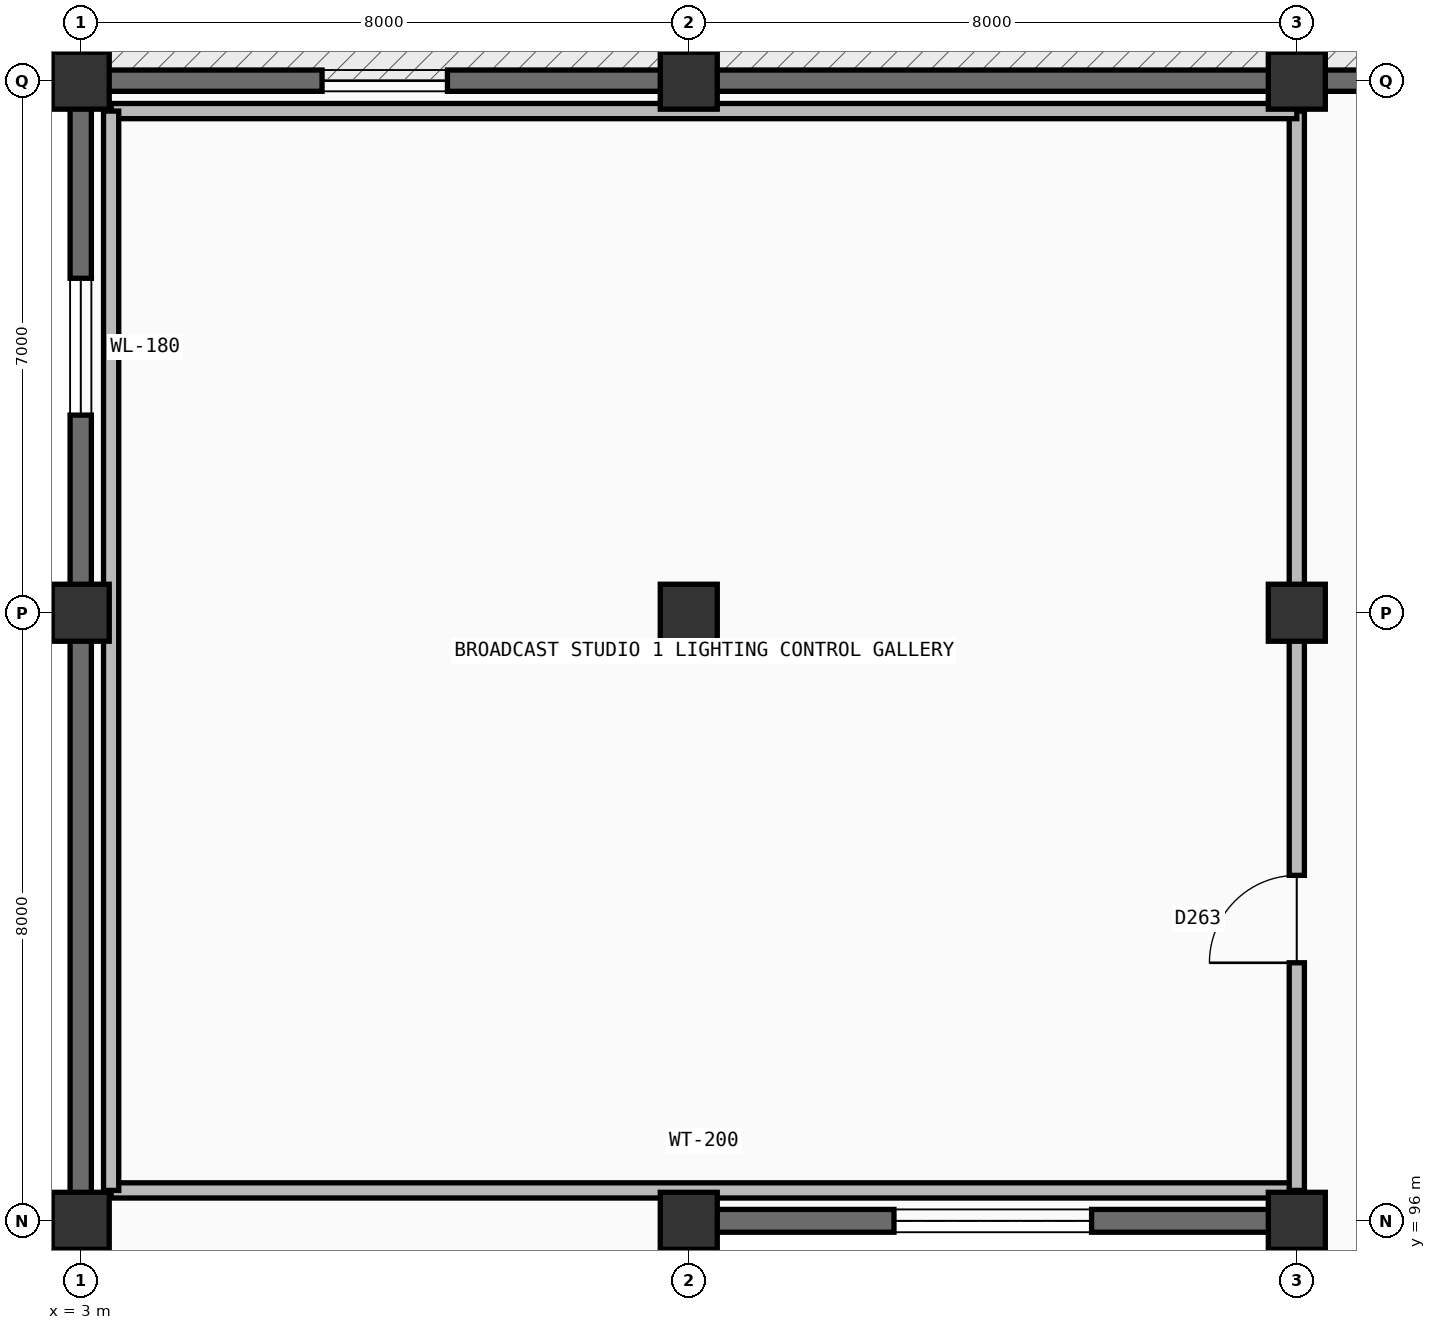
"""IFC4 building model, lengths in metres.
Left out: names, types, materials, properties, quantities, classifications, styles, units other than length and angle.
Written with IfcOpenShell. Run it as: python <this file> out.ifc"""

import sys

from ifc_helpers import new_model, si_unit, direction, frame, frame_2d, origin, origin_2d, place, context, subcontext, project, spatial, rectangle, extrude, element, fill, save


model = new_model("IFC4")
c1 = context("Model", 3, precision=1e-05, world=origin(), true_north=direction((0.0, 1.0)))
c2 = subcontext(c1, "Body", "Model", "MODEL_VIEW")
j1 = project(units=[si_unit("LENGTHUNIT", "METRE"), si_unit("PLANEANGLEUNIT", "RADIAN")], contexts=[c1])
p1 = place(None, origin())
s1 = spatial("IfcSite", under=j1, at=p1, CompositionType="ELEMENT")
p2 = place(p1, origin())
s2 = spatial("IfcBuilding", under=s1, at=p2, CompositionType="ELEMENT")
p3 = place(p2, frame((0.0, 0.0, 5.4)))
s3 = spatial("IfcBuildingStorey", under=s2, at=p3, CompositionType="ELEMENT", Elevation=5.4)
for number, where, z_axis, x_axis in (
    (1, (3.0, 96.0, 0.0), (0.0, 0.0, 1.0), (1.0, 0.0, 0.0)),
    (2, (3.0, 104.0, 0.0), (0.0, 0.0, 1.0), (1.0, 0.0, 0.0)),
    (3, (3.0, 111.0, 0.0), (0.0, 0.0, 1.0), (1.0, 0.0, 0.0)),
    (4, (11.0, 96.0, 0.0), (0.0, 0.0, 1.0), (1.0, 0.0, 0.0)),
    (5, (11.0, 104.0, 0.0), (0.0, 0.0, 1.0), (1.0, 0.0, 0.0)),
    (6, (11.0, 111.0, 0.0), (0.0, 0.0, 1.0), (1.0, 0.0, 0.0)),
    (7, (19.0, 96.0, 0.0), (0.0, 0.0, 1.0), (1.0, 0.0, 0.0)),
    (8, (19.0, 104.0, 0.0), (0.0, 0.0, 1.0), (1.0, 0.0, 0.0)),
    (9, (19.0, 111.0, 0.0), (0.0, 0.0, 1.0), (1.0, 0.0, 0.0)),
):
    element("IfcColumn", number, at=place(p3, frame(where, z_axis=z_axis, x_axis=x_axis)), inside=s3, PredefinedType="COLUMN", context=c2, shape_type="SweptSolid", body=[
        extrude(rectangle(XDim=0.75, YDim=0.75, at=origin_2d()), origin(), (0.0, 0.0, 1.0), 4.5),
    ])
p4 = place(p3, frame((3.0, 88.0, 0.0), z_axis=(0.0, 0.0, 1.0), x_axis=(0.0, 1.0, 0.0)))
e10 = element("IfcWall", 10, at=p4, inside=s3, PredefinedType="SOLIDWALL", context=c2, shape_type="SweptSolid", body=[
    extrude(rectangle(XDim=8.0, YDim=0.28, at=frame_2d((4.0, 0.0))), origin(), (0.0, 0.0, 1.0), 4.5),
])
p5 = place(p4, frame((3.025, 0.0, 1.1)))
e11 = element("IfcOpeningElement", 11, at=p5, cuts=e10, PredefinedType="OPENING", context=c2, shape_type="SweptSolid", body=[
    extrude(rectangle(XDim=1.95, YDim=0.9, at=frame_2d((0.975, 0.45))), frame((0.0, 0.15, 0.0), z_axis=(0.0, -1.0, 0.0), x_axis=(1.0, 0.0, 0.0)), (0.0, 0.0, 1.0), 0.3),
])
p6 = place(p3, frame((3.0, 96.0, 0.0), z_axis=(0.0, 0.0, 1.0), x_axis=(0.0, 1.0, 0.0)))
e12 = element("IfcWall", 12, at=p6, inside=s3, PredefinedType="SOLIDWALL", context=c2, shape_type="SweptSolid", body=[
    extrude(rectangle(XDim=8.0, YDim=0.28, at=frame_2d((4.0, 0.0))), origin(), (0.0, 0.0, 1.0), 4.5),
])
p7 = place(p3, frame((3.0, 104.0, 0.0), z_axis=(0.0, 0.0, 1.0), x_axis=(0.0, 1.0, 0.0)))
e13 = element("IfcWall", 13, at=p7, inside=s3, PredefinedType="SOLIDWALL", context=c2, shape_type="SweptSolid", body=[
    extrude(rectangle(XDim=7.0, YDim=0.28, at=frame_2d((3.5, 0.0))), origin(), (0.0, 0.0, 1.0), 4.5),
])
p8 = place(p7, frame((2.6, 0.0, 1.1)))
e14 = element("IfcOpeningElement", 14, at=p8, cuts=e13, PredefinedType="OPENING", context=c2, shape_type="SweptSolid", body=[
    extrude(rectangle(XDim=1.8, YDim=0.85, at=frame_2d((0.9, 0.425))), frame((0.0, 0.15, 0.0), z_axis=(0.0, -1.0, 0.0), x_axis=(1.0, 0.0, 0.0)), (0.0, 0.0, 1.0), 0.3),
])
p9 = place(p3, frame((3.0, 111.0, 0.0), z_axis=(0.0, 0.0, 1.0), x_axis=(1.0, 0.0, 0.0)))
e15 = element("IfcWall", 15, at=p9, inside=s3, PredefinedType="SOLIDWALL", context=c2, shape_type="SweptSolid", body=[
    extrude(rectangle(XDim=8.0, YDim=0.28, at=frame_2d((4.0, 0.0))), origin(), (0.0, 0.0, 1.0), 4.5),
])
p10 = place(p9, frame((3.175, 0.0, 1.1)))
e16 = element("IfcOpeningElement", 16, at=p10, cuts=e15, PredefinedType="OPENING", context=c2, shape_type="SweptSolid", body=[
    extrude(rectangle(XDim=1.65, YDim=0.8, at=frame_2d((0.825, 0.4))), frame((0.0, 0.15, 0.0), z_axis=(0.0, -1.0, 0.0), x_axis=(1.0, 0.0, 0.0)), (0.0, 0.0, 1.0), 0.3),
])
p11 = place(p3, frame((11.0, 111.0, 0.0), z_axis=(0.0, 0.0, 1.0), x_axis=(1.0, 0.0, 0.0)))
e17 = element("IfcWall", 17, at=p11, inside=s3, PredefinedType="SOLIDWALL", context=c2, shape_type="SweptSolid", body=[
    extrude(rectangle(XDim=8.0, YDim=0.28, at=frame_2d((4.0, 0.0))), origin(), (0.0, 0.0, 1.0), 4.5),
])
p12 = place(p3, frame((19.0, 111.0, 0.0), z_axis=(0.0, 0.0, 1.0), x_axis=(1.0, 0.0, 0.0)))
e18 = element("IfcWall", 18, at=p12, inside=s3, PredefinedType="SOLIDWALL", context=c2, shape_type="SweptSolid", body=[
    extrude(rectangle(XDim=8.0, YDim=0.28, at=frame_2d((4.0, 0.0))), origin(), (0.0, 0.0, 1.0), 4.5),
])
p13 = place(p12, frame((2.7, 0.0, 1.1)))
e19 = element("IfcOpeningElement", 19, at=p13, cuts=e18, PredefinedType="OPENING", context=c2, shape_type="SweptSolid", body=[
    extrude(rectangle(XDim=2.6, YDim=1.2, at=frame_2d((1.3, 0.6))), frame((0.0, 0.15, 0.0), z_axis=(0.0, -1.0, 0.0), x_axis=(1.0, 0.0, 0.0)), (0.0, 0.0, 1.0), 0.3),
])
p14 = place(p3, frame((19.0, 80.0, 0.0), z_axis=(0.0, 0.0, 1.0), x_axis=(0.0, 1.0, 0.0)))
e20 = element("IfcWall", 20, at=p14, inside=s3, PredefinedType="SHEAR", context=c2, shape_type="SweptSolid", body=[
    extrude(rectangle(XDim=16.0, YDim=0.3, at=frame_2d((8.0, 0.0))), origin(), (0.0, 0.0, 1.0), 4.2),
])
p15 = place(p3, frame((19.0, 96.0, 0.0), z_axis=(0.0, 0.0, 1.0), x_axis=(-1.0, 0.0, 0.0)))
e21 = element("IfcWall", 21, at=p15, inside=s3, PredefinedType="SHEAR", context=c2, shape_type="SweptSolid", body=[
    extrude(rectangle(XDim=8.0, YDim=0.3, at=frame_2d((4.0, 0.0))), origin(), (0.0, 0.0, 1.0), 4.2),
])
p16 = place(p15, frame((2.7, 0.0, 1.15)))
e22 = element("IfcOpeningElement", 22, at=p16, cuts=e21, PredefinedType="OPENING", context=c2, shape_type="SweptSolid", body=[
    extrude(rectangle(XDim=2.6, YDim=1.4, at=frame_2d((1.3, 0.7))), frame((0.0, 0.16, 0.0), z_axis=(0.0, -1.0, 0.0), x_axis=(1.0, 0.0, 0.0)), (0.0, 0.0, 1.0), 0.32),
])
p17 = place(p3, frame((11.0, 96.0, 0.0), z_axis=(0.0, 0.0, 1.0), x_axis=(0.0, -1.0, 0.0)))
e23 = element("IfcWall", 23, at=p17, inside=s3, PredefinedType="SHEAR", context=c2, shape_type="SweptSolid", body=[
    extrude(rectangle(XDim=16.0, YDim=0.3, at=frame_2d((8.0, 0.0))), origin(), (0.0, 0.0, 1.0), 4.2),
])
p18 = place(p3, frame((3.4, 96.4, 0.0), z_axis=(0.0, 0.0, 1.0), x_axis=(1.0, 0.0, 0.0)))
e24 = element("IfcWall", 24, at=p18, inside=s3, PredefinedType="PARTITIONING", context=c2, shape_type="SweptSolid", body=[
    extrude(rectangle(XDim=15.6, YDim=0.2, at=frame_2d((7.8, 0.0))), origin(), (0.0, 0.0, 1.0), 3.435),
])
p19 = place(p3, frame((19.0, 96.4, 0.0), z_axis=(0.0, 0.0, 1.0), x_axis=(0.0, 1.0, 0.0)))
e25 = element("IfcWall", 25, at=p19, inside=s3, PredefinedType="PARTITIONING", context=c2, shape_type="SweptSolid", body=[
    extrude(rectangle(XDim=14.2, YDim=0.2, at=frame_2d((7.1, 0.0))), origin(), (0.0, 0.0, 1.0), 3.485),
])
p20 = place(p19, frame((2.995, 0.0, 0.0)))
e26 = element("IfcOpeningElement", 26, at=p20, cuts=e25, PredefinedType="OPENING", context=c2, shape_type="SweptSolid", body=[
    extrude(rectangle(XDim=1.15, YDim=2.18, at=frame_2d((0.575, 1.09))), frame((0.0, 0.11, 0.0), z_axis=(0.0, -1.0, 0.0), x_axis=(1.0, 0.0, 0.0)), (0.0, 0.0, 1.0), 0.22),
])
p21 = place(p3, frame((3.4, 110.6, 0.0), z_axis=(0.0, 0.0, 1.0), x_axis=(1.0, 0.0, 0.0)))
e27 = element("IfcWall", 27, at=p21, inside=s3, PredefinedType="PARTITIONING", context=c2, shape_type="SweptSolid", body=[
    extrude(rectangle(XDim=15.6, YDim=0.2, at=frame_2d((7.8, 0.0))), origin(), (0.0, 0.0, 1.0), 4.2),
])
p22 = place(p3, frame((3.4, 96.4, 0.0), z_axis=(0.0, 0.0, 1.0), x_axis=(0.0, 1.0, 0.0)))
e28 = element("IfcWall", 28, at=p22, inside=s3, PredefinedType="PARTITIONING", context=c2, shape_type="SweptSolid", body=[
    extrude(rectangle(XDim=14.2, YDim=0.2, at=frame_2d((7.1, 0.0))), origin(), (0.0, 0.0, 1.0), 3.505),
])
p23 = place(p8, origin())
e29 = element("IfcWindow", 29, at=p23, inside=s3, PartitioningType="SINGLE_PANEL", PredefinedType="WINDOW", context=c2, shape_type="SweptSolid", body=[
    extrude(rectangle(XDim=1.8, YDim=0.85, at=frame_2d((0.9, 0.425))), frame((0.0, 0.03, 0.0), z_axis=(0.0, -1.0, 0.0), x_axis=(1.0, 0.0, 0.0)), (0.0, 0.0, 1.0), 0.06),
])
fill(e14, e29)
p24 = place(p10, origin())
e30 = element("IfcWindow", 30, at=p24, inside=s3, PartitioningType="SINGLE_PANEL", PredefinedType="WINDOW", context=c2, shape_type="SweptSolid", body=[
    extrude(rectangle(XDim=1.65, YDim=0.8, at=frame_2d((0.825, 0.4))), frame((0.0, 0.03, 0.0), z_axis=(0.0, -1.0, 0.0), x_axis=(1.0, 0.0, 0.0)), (0.0, 0.0, 1.0), 0.06),
])
fill(e16, e30)
p25 = place(p16, origin())
e31 = element("IfcWindow", 31, at=p25, inside=s3, PartitioningType="SINGLE_PANEL", PredefinedType="WINDOW", context=c2, shape_type="SweptSolid", body=[
    extrude(rectangle(XDim=2.6, YDim=1.4, at=frame_2d((1.3, 0.7))), frame((0.0, 0.03, 0.0), z_axis=(0.0, -1.0, 0.0), x_axis=(1.0, 0.0, 0.0)), (0.0, 0.0, 1.0), 0.06),
])
fill(e22, e31)
p26 = place(p20, origin())
e32 = element("IfcDoor", 32, at=p26, inside=s3, OperationType="SINGLE_SWING_LEFT", PredefinedType="DOOR", context=c2, shape_type="SweptSolid", body=[
    extrude(rectangle(XDim=1.15, YDim=2.18, at=frame_2d((0.575, 1.09))), frame((0.0, 0.025, 0.0), z_axis=(0.0, -1.0, 0.0), x_axis=(1.0, 0.0, 0.0)), (0.0, 0.0, 1.0), 0.05),
])
fill(e26, e32)
save(model, sys.argv[1])
